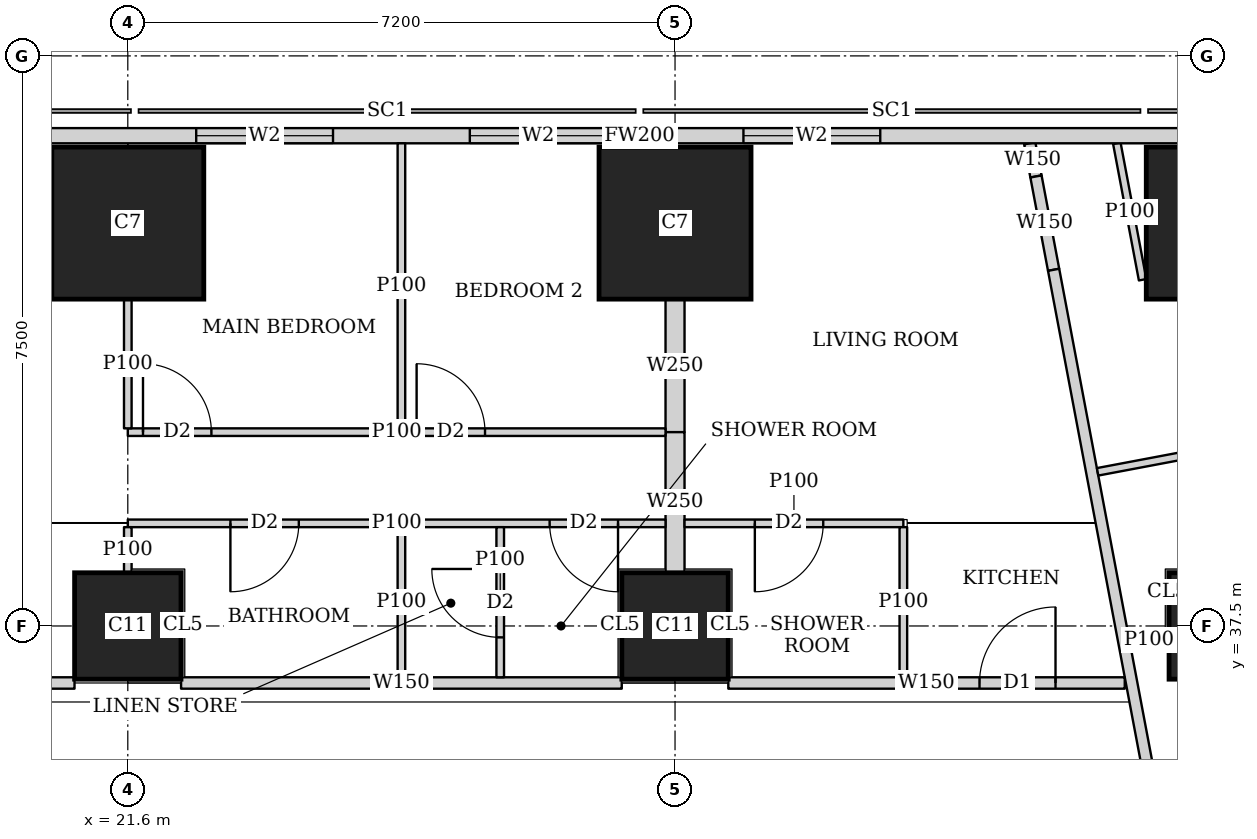
"""IFC4 building model, lengths in metres.
Left out: names, types, materials, properties, quantities, classifications, styles, units other than length and angle.
Written with IfcOpenShell. Run it as: python <this file> out.ifc"""

import sys

from ifc_helpers import new_model, si_unit, direction, frame, frame_2d, origin, origin_2d, place, context, subcontext, project, spatial, rectangle, extrude, element, fill, save


model = new_model("IFC4")
c1 = context("Model", 3, precision=1e-05, world=origin(), true_north=direction((0.0, 1.0)))
c2 = subcontext(c1, "Body", "Model", "MODEL_VIEW")
j1 = project(units=[si_unit("LENGTHUNIT", "METRE"), si_unit("PLANEANGLEUNIT", "RADIAN")], contexts=[c1])
p1 = place(None, origin())
s1 = spatial("IfcSite", under=j1, at=p1, CompositionType="ELEMENT")
p2 = place(p1, origin())
s2 = spatial("IfcBuilding", under=s1, at=p2, CompositionType="ELEMENT")
p3 = place(p2, frame((0.0, 0.0, 281.6)))
s3 = spatial("IfcBuildingStorey", under=s2, at=p3, CompositionType="ELEMENT", Elevation=281.6)
for number, where, z_axis, x_axis in (
    (1, (21.6, 37.5, 0.0), (0.0, 0.0, 1.0), (1.0, 0.0, 0.0)),
    (2, (28.8, 37.5, 0.0), (0.0, 0.0, 1.0), (1.0, 0.0, 0.0)),
    (3, (36.0, 37.5, 0.0), (0.0, 0.0, 1.0), (1.0, 0.0, 0.0)),
):
    element("IfcColumn", number, at=place(p3, frame(where, z_axis=z_axis, x_axis=x_axis)), inside=s3, PredefinedType="COLUMN", context=c2, shape_type="SweptSolid", body=[
        extrude(rectangle(XDim=1.4, YDim=1.4, at=origin_2d()), origin(), (0.0, 0.0, 1.0), 3.75),
    ])
for number, where, z_axis, x_axis in (
    (4, (21.6, 42.8, 0.0), (0.0, 0.0, 1.0), (1.0, 0.0, 0.0)),
    (5, (28.8, 42.8, 0.0), (0.0, 0.0, 1.0), (1.0, 0.0, 0.0)),
    (6, (36.0, 42.8, 0.0), (0.0, 0.0, 1.0), (1.0, 0.0, 0.0)),
):
    element("IfcColumn", number, at=place(p3, frame(where, z_axis=z_axis, x_axis=x_axis)), inside=s3, PredefinedType="COLUMN", context=c2, shape_type="SweptSolid", body=[
        extrude(rectangle(XDim=2.0, YDim=2.0, at=origin_2d()), origin(), (0.0, 0.0, 1.0), 3.75),
    ])
p4 = place(p3, frame((42.103, 43.95, 0.0), z_axis=(0.0, 0.0, 1.0), x_axis=(-1.0, 0.0, 0.0)))
e7 = element("IfcWall", 7, at=p4, inside=s3, PredefinedType="SOLIDWALL", context=c2, shape_type="SweptSolid", body=[
    extrude(rectangle(XDim=27.54, YDim=0.2, at=frame_2d((13.77, 0.0))), origin(), (0.0, 0.0, 1.0), 3.5),
])
p5 = place(p4, frame((10.603, 0.0, 0.9)))
e8 = element("IfcOpeningElement", 8, at=p5, cuts=e7, PredefinedType="OPENING", context=c2, shape_type="SweptSolid", body=[
    extrude(rectangle(XDim=1.8, YDim=1.5, at=frame_2d((0.9, 0.75))), frame((0.0, 0.11, 0.0), z_axis=(0.0, -1.0, 0.0), x_axis=(1.0, 0.0, 0.0)), (0.0, 0.0, 1.0), 0.22),
])
p6 = place(p4, frame((14.203, 0.0, 0.9)))
e9 = element("IfcOpeningElement", 9, at=p6, cuts=e7, PredefinedType="OPENING", context=c2, shape_type="SweptSolid", body=[
    extrude(rectangle(XDim=1.8, YDim=1.5, at=frame_2d((0.9, 0.75))), frame((0.0, 0.11, 0.0), z_axis=(0.0, -1.0, 0.0), x_axis=(1.0, 0.0, 0.0)), (0.0, 0.0, 1.0), 0.22),
])
p7 = place(p4, frame((17.803, 0.0, 0.9)))
e10 = element("IfcOpeningElement", 10, at=p7, cuts=e7, PredefinedType="OPENING", context=c2, shape_type="SweptSolid", body=[
    extrude(rectangle(XDim=1.8, YDim=1.5, at=frame_2d((0.9, 0.75))), frame((0.0, 0.11, 0.0), z_axis=(0.0, -1.0, 0.0), x_axis=(1.0, 0.0, 0.0)), (0.0, 0.0, 1.0), 0.22),
])
p8 = place(p4, frame((22.822, 0.0, 0.9)))
e11 = element("IfcOpeningElement", 11, at=p8, cuts=e7, PredefinedType="OPENING", context=c2, shape_type="SweptSolid", body=[
    extrude(rectangle(XDim=2.4, YDim=1.5, at=frame_2d((1.2, 0.75))), frame((0.0, 0.11, 0.0), z_axis=(0.0, -1.0, 0.0), x_axis=(1.0, 0.0, 0.0)), (0.0, 0.0, 1.0), 0.22),
])
p9 = place(p3, frame((16.001, 36.75, 0.0), z_axis=(0.0, 0.0, 1.0), x_axis=(1.0, 0.0, 0.0)))
e12 = element("IfcWall", 12, at=p9, inside=s3, PredefinedType="SOLIDWALL", context=c2, shape_type="SweptSolid", body=[
    extrude(rectangle(XDim=4.898, YDim=0.15, at=frame_2d((2.449, 0.0))), origin(), (0.0, 0.0, 1.0), 3.5),
])
p10 = place(p9, frame((1.074, 0.0, 0.0)))
e13 = element("IfcOpeningElement", 13, at=p10, cuts=e12, PredefinedType="OPENING", context=c2, shape_type="SweptSolid", body=[
    extrude(rectangle(XDim=1.0, YDim=2.1, at=frame_2d((0.5, 1.05))), frame((0.0, 0.085, 0.0), z_axis=(0.0, -1.0, 0.0), x_axis=(1.0, 0.0, 0.0)), (0.0, 0.0, 1.0), 0.17),
])
p11 = place(p3, frame((22.301, 36.75, 0.0), z_axis=(0.0, 0.0, 1.0), x_axis=(1.0, 0.0, 0.0)))
e14 = element("IfcWall", 14, at=p11, inside=s3, PredefinedType="SOLIDWALL", context=c2, shape_type="SweptSolid", body=[
    extrude(rectangle(XDim=5.798, YDim=0.15, at=frame_2d((2.899, 0.0))), origin(), (0.0, 0.0, 1.0), 3.5),
])
p12 = place(p3, frame((29.501, 36.75, 0.0), z_axis=(0.0, 0.0, 1.0), x_axis=(1.0, 0.0, 0.0)))
e15 = element("IfcWall", 15, at=p12, inside=s3, PredefinedType="SOLIDWALL", context=c2, shape_type="SweptSolid", body=[
    extrude(rectangle(XDim=5.216, YDim=0.15, at=frame_2d((2.608, 0.0))), origin(), (0.0, 0.0, 1.0), 3.5),
])
p13 = place(p12, frame((3.305, 0.0, 0.0)))
e16 = element("IfcOpeningElement", 16, at=p13, cuts=e15, PredefinedType="OPENING", context=c2, shape_type="SweptSolid", body=[
    extrude(rectangle(XDim=1.0, YDim=2.1, at=frame_2d((0.5, 1.05))), frame((0.0, 0.085, 0.0), z_axis=(0.0, -1.0, 0.0), x_axis=(1.0, 0.0, 0.0)), (0.0, 0.0, 1.0), 0.17),
])
p14 = place(p3, frame((33.467, 43.85, 0.0), z_axis=(0.0, 0.0, 1.0), x_axis=(0.184886516626, -0.982759877066, 0.0)))
e17 = element("IfcWall", 17, at=p14, inside=s3, PredefinedType="SOLIDWALL", context=c2, shape_type="SweptSolid", body=[
    extrude(rectangle(XDim=0.444, YDim=0.15, at=frame_2d((0.222, 0.0))), origin(), (0.0, 0.0, 1.0), 3.5),
])
p15 = place(p3, frame((33.549, 43.414, 0.0), z_axis=(0.0, 0.0, 1.0), x_axis=(0.185585816539, -0.982628060204, 0.0)))
e18 = element("IfcWall", 18, at=p15, inside=s3, PredefinedType="SOLIDWALL", context=c2, shape_type="SweptSolid", body=[
    extrude(rectangle(XDim=1.25, YDim=0.15, at=frame_2d((0.625, 0.0))), origin(), (0.0, 0.0, 1.0), 2.05),
])
p16 = place(p3, frame((33.781, 42.186, 0.0), z_axis=(0.0, 0.0, 1.0), x_axis=(0.185593518645, -0.9826266055, 0.0)))
e19 = element("IfcWall", 19, at=p16, inside=s3, PredefinedType="SOLIDWALL", context=c2, shape_type="SweptSolid", body=[
    extrude(rectangle(XDim=35.961, YDim=0.15, at=frame_2d((17.98, 0.0))), origin(), (0.0, 0.0, 1.0), 2.5),
])
p17 = place(p16, frame((11.76, 0.0, 0.0)))
e20 = element("IfcOpeningElement", 20, at=p17, cuts=e19, PredefinedType="OPENING", context=c2, shape_type="SweptSolid", body=[
    extrude(rectangle(XDim=1.0, YDim=2.1, at=frame_2d((0.5, 1.05))), frame((0.0, 0.085, 0.0), z_axis=(0.0, -1.0, 0.0), x_axis=(1.0, 0.0, 0.0)), (0.0, 0.0, 1.0), 0.17),
])
p18 = place(p16, frame((15.576, 0.0, 0.0)))
e21 = element("IfcOpeningElement", 21, at=p18, cuts=e19, PredefinedType="OPENING", context=c2, shape_type="SweptSolid", body=[
    extrude(rectangle(XDim=1.0, YDim=2.1, at=frame_2d((0.5, 1.05))), frame((0.0, 0.085, 0.0), z_axis=(0.0, -1.0, 0.0), x_axis=(1.0, 0.0, 0.0)), (0.0, 0.0, 1.0), 0.17),
])
p19 = place(p16, frame((30.502, 0.0, 0.0)))
e22 = element("IfcOpeningElement", 22, at=p19, cuts=e19, PredefinedType="OPENING", context=c2, shape_type="SweptSolid", body=[
    extrude(rectangle(XDim=1.0, YDim=2.1, at=frame_2d((0.5, 1.05))), frame((0.0, 0.085, 0.0), z_axis=(0.0, -1.0, 0.0), x_axis=(1.0, 0.0, 0.0)), (0.0, 0.0, 1.0), 0.17),
])
p20 = place(p3, frame((34.952, 42.055, 0.0), z_axis=(0.0, 0.0, 1.0), x_axis=(-0.185490642006, 0.98264603074, 0.0)))
e23 = element("IfcWall", 23, at=p20, inside=s3, PredefinedType="PARTITIONING", context=c2, shape_type="SweptSolid", body=[
    extrude(rectangle(XDim=1.827, YDim=0.1, at=frame_2d((0.914, 0.0))), origin(), (0.0, 0.0, 1.0), 2.05),
])
p21 = place(p3, frame((37.823, 40.182, 0.0), z_axis=(0.0, 0.0, 1.0), x_axis=(-0.98263926043, -0.185526504472, 0.0)))
e24 = element("IfcWall", 24, at=p21, inside=s3, PredefinedType="PARTITIONING", context=c2, shape_type="SweptSolid", body=[
    extrude(rectangle(XDim=3.524, YDim=0.1, at=frame_2d((1.762, 0.0))), origin(), (0.0, 0.0, 1.0), 3.5),
])
p22 = place(p3, frame((35.29, 37.366, 0.0), z_axis=(0.0, 0.0, 1.0), x_axis=(-0.982715597703, -0.185121727606, 0.0)))
e25 = element("IfcWall", 25, at=p22, inside=s3, PredefinedType="PARTITIONING", context=c2, shape_type="SweptSolid", body=[
    extrude(rectangle(XDim=0.513, YDim=0.1, at=frame_2d((0.256, 0.0))), origin(), (0.0, 0.0, 1.0), 3.5),
])
p23 = place(p3, frame((21.6, 40.05, 0.0), z_axis=(0.0, 0.0, 1.0), x_axis=(1.0, 0.0, 0.0)))
e26 = element("IfcWall", 26, at=p23, inside=s3, PredefinedType="PARTITIONING", context=c2, shape_type="SweptSolid", body=[
    extrude(rectangle(XDim=7.075, YDim=0.1, at=frame_2d((3.538, 0.0))), origin(), (0.0, 0.0, 1.0), 3.5),
])
p24 = place(p23, frame((0.2, 0.0, 0.0)))
e27 = element("IfcOpeningElement", 27, at=p24, cuts=e26, PredefinedType="OPENING", context=c2, shape_type="SweptSolid", body=[
    extrude(rectangle(XDim=0.9, YDim=2.1, at=frame_2d((0.45, 1.05))), frame((0.0, 0.06, 0.0), z_axis=(0.0, -1.0, 0.0), x_axis=(1.0, 0.0, 0.0)), (0.0, 0.0, 1.0), 0.12),
])
p25 = place(p23, frame((3.8, 0.0, 0.0)))
e28 = element("IfcOpeningElement", 28, at=p25, cuts=e26, PredefinedType="OPENING", context=c2, shape_type="SweptSolid", body=[
    extrude(rectangle(XDim=0.9, YDim=2.1, at=frame_2d((0.45, 1.05))), frame((0.0, 0.06, 0.0), z_axis=(0.0, -1.0, 0.0), x_axis=(1.0, 0.0, 0.0)), (0.0, 0.0, 1.0), 0.12),
])
p26 = place(p3, frame((21.6, 38.85, 0.0), z_axis=(0.0, 0.0, 1.0), x_axis=(1.0, 0.0, 0.0)))
e29 = element("IfcWall", 29, at=p26, inside=s3, PredefinedType="PARTITIONING", context=c2, shape_type="SweptSolid", body=[
    extrude(rectangle(XDim=7.075, YDim=0.1, at=frame_2d((3.538, 0.0))), origin(), (0.0, 0.0, 1.0), 3.5),
])
p27 = place(p26, frame((1.35, 0.0, 0.0)))
e30 = element("IfcOpeningElement", 30, at=p27, cuts=e29, PredefinedType="OPENING", context=c2, shape_type="SweptSolid", body=[
    extrude(rectangle(XDim=0.9, YDim=2.1, at=frame_2d((0.45, 1.05))), frame((0.0, 0.06, 0.0), z_axis=(0.0, -1.0, 0.0), x_axis=(1.0, 0.0, 0.0)), (0.0, 0.0, 1.0), 0.12),
])
p28 = place(p26, frame((5.55, 0.0, 0.0)))
e31 = element("IfcOpeningElement", 31, at=p28, cuts=e29, PredefinedType="OPENING", context=c2, shape_type="SweptSolid", body=[
    extrude(rectangle(XDim=0.9, YDim=2.1, at=frame_2d((0.45, 1.05))), frame((0.0, 0.06, 0.0), z_axis=(0.0, -1.0, 0.0), x_axis=(1.0, 0.0, 0.0)), (0.0, 0.0, 1.0), 0.12),
])
p29 = place(p3, frame((21.6, 40.1, 0.0), z_axis=(0.0, 0.0, 1.0), x_axis=(0.0, 1.0, 0.0)))
e32 = element("IfcWall", 32, at=p29, inside=s3, PredefinedType="PARTITIONING", context=c2, shape_type="SweptSolid", body=[
    extrude(rectangle(XDim=1.699, YDim=0.1, at=frame_2d((0.85, 0.0))), origin(), (0.0, 0.0, 1.0), 3.5),
])
p30 = place(p3, frame((25.2, 40.1, 0.0), z_axis=(0.0, 0.0, 1.0), x_axis=(0.0, 1.0, 0.0)))
e33 = element("IfcWall", 33, at=p30, inside=s3, PredefinedType="PARTITIONING", context=c2, shape_type="SweptSolid", body=[
    extrude(rectangle(XDim=3.75, YDim=0.1, at=frame_2d((1.875, 0.0))), origin(), (0.0, 0.0, 1.0), 2.05),
])
p31 = place(p3, frame((21.6, 38.201, 0.0), z_axis=(0.0, 0.0, 1.0), x_axis=(0.0, 1.0, 0.0)))
e34 = element("IfcWall", 34, at=p31, inside=s3, PredefinedType="PARTITIONING", context=c2, shape_type="SweptSolid", body=[
    extrude(rectangle(XDim=0.599, YDim=0.1, at=frame_2d((0.3, 0.0))), origin(), (0.0, 0.0, 1.0), 3.5),
])
p32 = place(p3, frame((25.2, 36.825, 0.0), z_axis=(0.0, 0.0, 1.0), x_axis=(0.0, 1.0, 0.0)))
e35 = element("IfcWall", 35, at=p32, inside=s3, PredefinedType="PARTITIONING", context=c2, shape_type="SweptSolid", body=[
    extrude(rectangle(XDim=1.975, YDim=0.1, at=frame_2d((0.988, 0.0))), origin(), (0.0, 0.0, 1.0), 3.5),
])
p33 = place(p3, frame((26.5, 36.825, 0.0), z_axis=(0.0, 0.0, 1.0), x_axis=(0.0, 1.0, 0.0)))
e36 = element("IfcWall", 36, at=p33, inside=s3, PredefinedType="PARTITIONING", context=c2, shape_type="SweptSolid", body=[
    extrude(rectangle(XDim=1.975, YDim=0.1, at=frame_2d((0.988, 0.0))), origin(), (0.0, 0.0, 1.0), 3.5),
])
p34 = place(p33, frame((0.525, 0.0, 0.0)))
e37 = element("IfcOpeningElement", 37, at=p34, cuts=e36, PredefinedType="OPENING", context=c2, shape_type="SweptSolid", body=[
    extrude(rectangle(XDim=0.9, YDim=2.1, at=frame_2d((0.45, 1.05))), frame((0.0, 0.06, 0.0), z_axis=(0.0, -1.0, 0.0), x_axis=(1.0, 0.0, 0.0)), (0.0, 0.0, 1.0), 0.12),
])
p35 = place(p3, frame((28.925, 38.85, 0.0), z_axis=(0.0, 0.0, 1.0), x_axis=(1.0, 0.0, 0.0)))
e38 = element("IfcWall", 38, at=p35, inside=s3, PredefinedType="PARTITIONING", context=c2, shape_type="SweptSolid", body=[
    extrude(rectangle(XDim=2.879, YDim=0.1, at=frame_2d((1.439, 0.0))), origin(), (0.0, 0.0, 1.0), 3.5),
])
p36 = place(p35, frame((0.925, 0.0, 0.0)))
e39 = element("IfcOpeningElement", 39, at=p36, cuts=e38, PredefinedType="OPENING", context=c2, shape_type="SweptSolid", body=[
    extrude(rectangle(XDim=0.9, YDim=2.1, at=frame_2d((0.45, 1.05))), frame((0.0, 0.06, 0.0), z_axis=(0.0, -1.0, 0.0), x_axis=(1.0, 0.0, 0.0)), (0.0, 0.0, 1.0), 0.12),
])
p37 = place(p3, frame((31.804, 36.825, 0.0), z_axis=(0.0, 0.0, 1.0), x_axis=(0.0, 1.0, 0.0)))
e40 = element("IfcWall", 40, at=p37, inside=s3, PredefinedType="PARTITIONING", context=c2, shape_type="SweptSolid", body=[
    extrude(rectangle(XDim=1.975, YDim=0.1, at=frame_2d((0.988, 0.0))), origin(), (0.0, 0.0, 1.0), 3.5),
])
p38 = place(p3, frame((28.8, 40.05, 0.0), z_axis=(0.0, 0.0, 1.0), x_axis=(0.0, 1.0, 0.0)))
e41 = element("IfcWall", 41, at=p38, inside=s3, PredefinedType="SOLIDWALL", context=c2, shape_type="SweptSolid", body=[
    extrude(rectangle(XDim=1.749, YDim=0.25, at=frame_2d((0.875, 0.0))), origin(), (0.0, 0.0, 1.0), 3.5),
])
p39 = place(p3, frame((28.8, 38.201, 0.0), z_axis=(0.0, 0.0, 1.0), x_axis=(0.0, 1.0, 0.0)))
e42 = element("IfcWall", 42, at=p39, inside=s3, PredefinedType="SOLIDWALL", context=c2, shape_type="SweptSolid", body=[
    extrude(rectangle(XDim=1.849, YDim=0.25, at=frame_2d((0.925, 0.0))), origin(), (0.0, 0.0, 1.0), 3.5),
])
p40 = place(p5, origin())
e43 = element("IfcWindow", 43, at=p40, inside=s3, PartitioningType="SINGLE_PANEL", PredefinedType="WINDOW", context=c2, shape_type="SweptSolid", body=[
    extrude(rectangle(XDim=1.8, YDim=1.5, at=frame_2d((0.9, 0.75))), frame((0.0, 0.03, 0.0), z_axis=(0.0, -1.0, 0.0), x_axis=(1.0, 0.0, 0.0)), (0.0, 0.0, 1.0), 0.06),
])
fill(e8, e43)
p41 = place(p6, origin())
e44 = element("IfcWindow", 44, at=p41, inside=s3, PartitioningType="SINGLE_PANEL", PredefinedType="WINDOW", context=c2, shape_type="SweptSolid", body=[
    extrude(rectangle(XDim=1.8, YDim=1.5, at=frame_2d((0.9, 0.75))), frame((0.0, 0.03, 0.0), z_axis=(0.0, -1.0, 0.0), x_axis=(1.0, 0.0, 0.0)), (0.0, 0.0, 1.0), 0.06),
])
fill(e9, e44)
p42 = place(p7, origin())
e45 = element("IfcWindow", 45, at=p42, inside=s3, PartitioningType="SINGLE_PANEL", PredefinedType="WINDOW", context=c2, shape_type="SweptSolid", body=[
    extrude(rectangle(XDim=1.8, YDim=1.5, at=frame_2d((0.9, 0.75))), frame((0.0, 0.03, 0.0), z_axis=(0.0, -1.0, 0.0), x_axis=(1.0, 0.0, 0.0)), (0.0, 0.0, 1.0), 0.06),
])
fill(e10, e45)
p43 = place(p24, origin())
e46 = element("IfcDoor", 46, at=p43, inside=s3, OperationType="SINGLE_SWING_LEFT", PredefinedType="DOOR", context=c2, shape_type="SweptSolid", body=[
    extrude(rectangle(XDim=0.9, YDim=2.1, at=frame_2d((0.45, 1.05))), frame((0.0, 0.025, 0.0), z_axis=(0.0, -1.0, 0.0), x_axis=(1.0, 0.0, 0.0)), (0.0, 0.0, 1.0), 0.05),
])
fill(e27, e46)
p44 = place(p25, origin())
e47 = element("IfcDoor", 47, at=p44, inside=s3, OperationType="SINGLE_SWING_LEFT", PredefinedType="DOOR", context=c2, shape_type="SweptSolid", body=[
    extrude(rectangle(XDim=0.9, YDim=2.1, at=frame_2d((0.45, 1.05))), frame((0.0, 0.025, 0.0), z_axis=(0.0, -1.0, 0.0), x_axis=(1.0, 0.0, 0.0)), (0.0, 0.0, 1.0), 0.05),
])
fill(e28, e47)
p45 = place(p27, origin())
e48 = element("IfcDoor", 48, at=p45, inside=s3, OperationType="SINGLE_SWING_RIGHT", PredefinedType="DOOR", context=c2, shape_type="SweptSolid", body=[
    extrude(rectangle(XDim=0.9, YDim=2.1, at=frame_2d((0.45, 1.05))), frame((0.0, 0.025, 0.0), z_axis=(0.0, -1.0, 0.0), x_axis=(1.0, 0.0, 0.0)), (0.0, 0.0, 1.0), 0.05),
])
fill(e30, e48)
p46 = place(p28, origin())
e49 = element("IfcDoor", 49, at=p46, inside=s3, OperationType="SINGLE_SWING_LEFT", PredefinedType="DOOR", context=c2, shape_type="SweptSolid", body=[
    extrude(rectangle(XDim=0.9, YDim=2.1, at=frame_2d((0.45, 1.05))), frame((0.0, 0.025, 0.0), z_axis=(0.0, -1.0, 0.0), x_axis=(1.0, 0.0, 0.0)), (0.0, 0.0, 1.0), 0.05),
])
fill(e31, e49)
p47 = place(p34, origin())
e50 = element("IfcDoor", 50, at=p47, inside=s3, OperationType="SINGLE_SWING_RIGHT", PredefinedType="DOOR", context=c2, shape_type="SweptSolid", body=[
    extrude(rectangle(XDim=0.9, YDim=2.1, at=frame_2d((0.45, 1.05))), frame((0.0, 0.025, 0.0), z_axis=(0.0, -1.0, 0.0), x_axis=(1.0, 0.0, 0.0)), (0.0, 0.0, 1.0), 0.05),
])
fill(e37, e50)
p48 = place(p36, origin())
e51 = element("IfcDoor", 51, at=p48, inside=s3, OperationType="SINGLE_SWING_RIGHT", PredefinedType="DOOR", context=c2, shape_type="SweptSolid", body=[
    extrude(rectangle(XDim=0.9, YDim=2.1, at=frame_2d((0.45, 1.05))), frame((0.0, 0.025, 0.0), z_axis=(0.0, -1.0, 0.0), x_axis=(1.0, 0.0, 0.0)), (0.0, 0.0, 1.0), 0.05),
])
fill(e39, e51)
p49 = place(p13, origin())
e52 = element("IfcDoor", 52, at=p49, inside=s3, OperationType="SINGLE_SWING_RIGHT", PredefinedType="DOOR", context=c2, shape_type="SweptSolid", body=[
    extrude(rectangle(XDim=1.0, YDim=2.1, at=frame_2d((0.5, 1.05))), frame((0.0, 0.025, 0.0), z_axis=(0.0, -1.0, 0.0), x_axis=(1.0, 0.0, 0.0)), (0.0, 0.0, 1.0), 0.05),
])
fill(e16, e52)
save(model, sys.argv[1])
